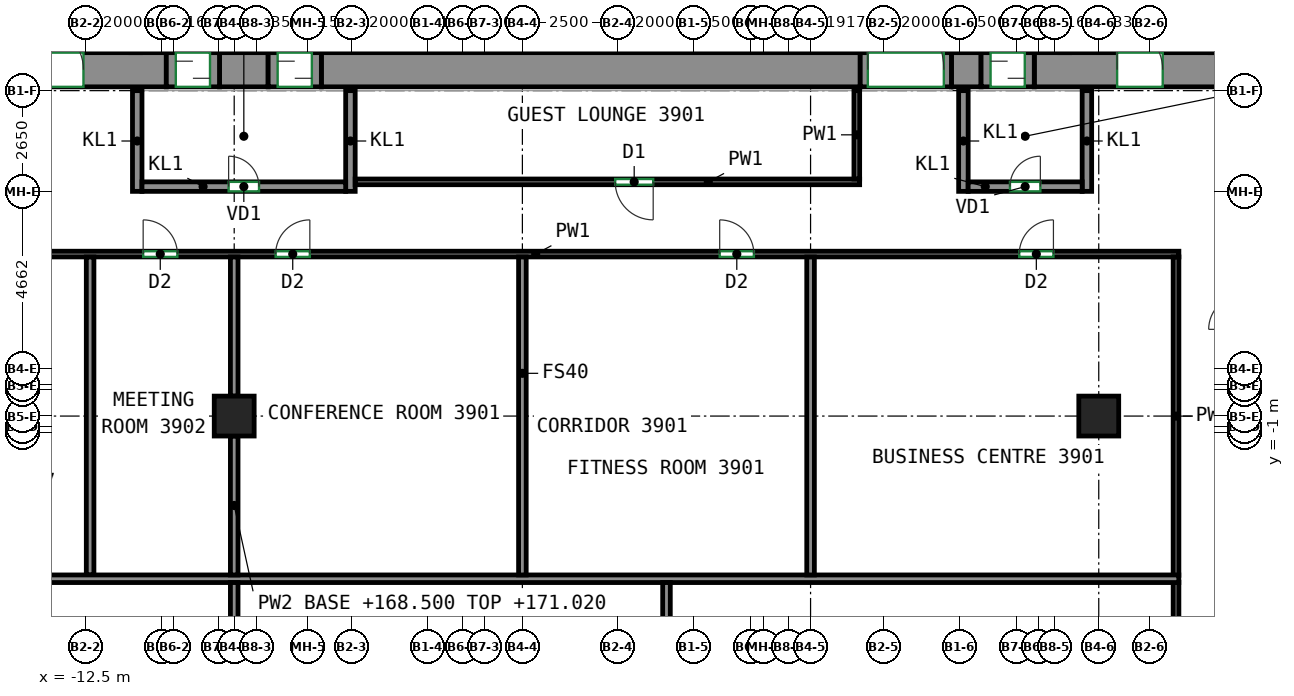
"""IFC4 building model, lengths in metres.
Left out: names, types, materials, properties, quantities, classifications, styles, units other than length and angle.
Written with IfcOpenShell. Run it as: python <this file> out.ifc"""

import sys

from ifc_helpers import new_model, si_unit, direction, frame, frame_2d, origin, origin_2d, place, context, subcontext, project, spatial, rectangle, extrude, source, transform, mapped, element, fill, save


model = new_model("IFC4")
c1 = context("Model", 3, precision=1e-05, world=origin(), true_north=direction((0.0, 1.0)))
c2 = subcontext(c1, "Body", "Model", "MODEL_VIEW")
j1 = project(units=[si_unit("LENGTHUNIT", "METRE"), si_unit("PLANEANGLEUNIT", "RADIAN")], contexts=[c1])
p1 = place(None, origin())
s1 = spatial("IfcSite", under=j1, at=p1, CompositionType="ELEMENT")
p2 = place(p1, origin())
s2 = spatial("IfcBuilding", under=s1, at=p2, CompositionType="ELEMENT")
p3 = place(p2, frame((0.0, 0.0, 168.5)))
s3 = spatial("IfcBuildingStorey", under=s2, at=p3, CompositionType="ELEMENT", Elevation=168.5)
m1 = source(origin(), c2, "Body", "SweptSolid", [
    extrude(rectangle(XDim=1.05, YDim=1.05, at=origin_2d()), origin(), (0.0, 0.0, 1.0), 3.12),
])
for number, where, z_axis, x_axis in (
    (1, (-8.583, -0.562, 0.0), (0.0, 0.0, 1.0), (1.0, 0.0, 0.0)),
    (2, (14.167, -0.562, 0.0), (0.0, 0.0, 1.0), (1.0, 0.0, 0.0)),
):
    element("IfcColumn", number, at=place(p3, frame(where, z_axis=z_axis, x_axis=x_axis)), inside=s3, PredefinedType="COLUMN", context=c2, shape_type="MappedRepresentation", body=[
        mapped(m1, transform((0.0, 0.0, 0.0))),
    ])
m2 = source(origin(), c2, "Body", "SweptSolid", [
    extrude(rectangle(XDim=5.53, YDim=0.9, at=frame_2d((2.765, 0.0))), origin(), (0.0, 0.0, 1.0), 3.12),
])
p4 = place(p3, frame((-15.9, 8.55, 0.0), z_axis=(0.0, 0.0, 1.0), x_axis=(1.0, 0.0, 0.0)))
e3 = element("IfcWall", 3, at=p4, inside=s3, PredefinedType="SHEAR", context=c2, shape_type="MappedRepresentation", body=[
    mapped(m2, transform((0.0, 0.0, 0.0))),
])
p5 = place(p4, frame((2.15, 0.0, 0.0)))
e4 = element("IfcOpeningElement", 4, at=p5, cuts=e3, PredefinedType="OPENING", context=c2, shape_type="SweptSolid", body=[
    extrude(rectangle(XDim=1.2, YDim=2.1, at=frame_2d((0.6, 1.05))), frame((0.0, 0.46, 0.0), z_axis=(0.0, -1.0, 0.0), x_axis=(1.0, 0.0, 0.0)), (0.0, 0.0, 1.0), 0.92),
])
m3 = source(origin(), c2, "Body", "SweptSolid", [
    extrude(rectangle(XDim=1.28, YDim=0.9, at=frame_2d((0.64, 0.0))), origin(), (0.0, 0.0, 1.0), 3.12),
])
p6 = place(p3, frame((-8.97, 8.55, 0.0), z_axis=(0.0, 0.0, 1.0), x_axis=(1.0, 0.0, 0.0)))
e5 = element("IfcWall", 5, at=p6, inside=s3, PredefinedType="SHEAR", context=c2, shape_type="MappedRepresentation", body=[
    mapped(m3, transform((0.0, 0.0, 0.0))),
])
m4 = source(origin(), c2, "Body", "SweptSolid", [
    extrude(rectangle(XDim=14.18, YDim=0.9, at=frame_2d((7.09, 0.0))), origin(), (0.0, 0.0, 1.0), 3.12),
])
p7 = place(p3, frame((-6.29, 8.55, 0.0), z_axis=(0.0, 0.0, 1.0), x_axis=(1.0, 0.0, 0.0)))
e6 = element("IfcWall", 6, at=p7, inside=s3, PredefinedType="SHEAR", context=c2, shape_type="MappedRepresentation", body=[
    mapped(m4, transform((0.0, 0.0, 0.0))),
])
m5 = source(origin(), c2, "Body", "SweptSolid", [
    extrude(rectangle(XDim=0.78, YDim=0.9, at=frame_2d((0.39, 0.0))), origin(), (0.0, 0.0, 1.0), 3.12),
])
p8 = place(p3, frame((10.29, 8.55, 0.0), z_axis=(0.0, 0.0, 1.0), x_axis=(1.0, 0.0, 0.0)))
e7 = element("IfcWall", 7, at=p8, inside=s3, PredefinedType="SHEAR", context=c2, shape_type="MappedRepresentation", body=[
    mapped(m5, transform((0.0, 0.0, 0.0))),
])
m6 = source(origin(), c2, "Body", "SweptSolid", [
    extrude(rectangle(XDim=5.53, YDim=0.9, at=frame_2d((2.765, 0.0))), origin(), (0.0, 0.0, 1.0), 3.12),
])
p9 = place(p3, frame((12.47, 8.55, 0.0), z_axis=(0.0, 0.0, 1.0), x_axis=(1.0, 0.0, 0.0)))
e8 = element("IfcWall", 8, at=p9, inside=s3, PredefinedType="SHEAR", context=c2, shape_type="MappedRepresentation", body=[
    mapped(m6, transform((0.0, 0.0, 0.0))),
])
p10 = place(p9, frame((2.18, 0.0, 0.0)))
e9 = element("IfcOpeningElement", 9, at=p10, cuts=e8, PredefinedType="OPENING", context=c2, shape_type="SweptSolid", body=[
    extrude(rectangle(XDim=1.2, YDim=2.1, at=frame_2d((0.6, 1.05))), frame((0.0, 0.46, 0.0), z_axis=(0.0, -1.0, 0.0), x_axis=(1.0, 0.0, 0.0)), (0.0, 0.0, 1.0), 0.92),
])
m7 = source(origin(), c2, "Body", "SweptSolid", [
    extrude(rectangle(XDim=2.65, YDim=0.25, at=frame_2d((1.325, 0.0))), origin(), (0.0, 0.0, 1.0), 3.12),
])
for number, where, z_axis, x_axis in (
    (10, (-11.135, 5.35, 0.0), (0.0, 0.0, 1.0), (0.0, 1.0, 0.0)),
    (11, (-5.525, 5.35, 0.0), (0.0, 0.0, 1.0), (0.0, 1.0, 0.0)),
):
    element("IfcWall", number, at=place(p3, frame(where, z_axis=z_axis, x_axis=x_axis)), inside=s3, PredefinedType="PARTITIONING", context=c2, shape_type="MappedRepresentation", body=[
        mapped(m7, transform((0.0, 0.0, 0.0))),
    ])
m8 = source(origin(), c2, "Body", "SweptSolid", [
    extrude(rectangle(XDim=5.36, YDim=0.25, at=frame_2d((2.68, 0.0))), origin(), (0.0, 0.0, 1.0), 3.12),
])
p11 = place(p3, frame((-11.01, 5.475, 0.0), z_axis=(0.0, 0.0, 1.0), x_axis=(1.0, 0.0, 0.0)))
e12 = element("IfcWall", 12, at=p11, inside=s3, PredefinedType="PARTITIONING", context=c2, shape_type="MappedRepresentation", body=[
    mapped(m8, transform((0.0, 0.0, 0.0))),
])
p12 = place(p11, frame((2.28, 0.0, 0.0)))
e13 = element("IfcOpeningElement", 13, at=p12, cuts=e12, PredefinedType="OPENING", context=c2, shape_type="SweptSolid", body=[
    extrude(rectangle(XDim=0.8, YDim=2.0, at=frame_2d((0.4, 1.0))), frame((0.0, 0.135, 0.0), z_axis=(0.0, -1.0, 0.0), x_axis=(1.0, 0.0, 0.0)), (0.0, 0.0, 1.0), 0.27),
])
for number, where, z_axis, x_axis in (
    (14, (10.605, 5.35, 0.0), (0.0, 0.0, 1.0), (0.0, 1.0, 0.0)),
    (15, (13.855, 5.35, 0.0), (0.0, 0.0, 1.0), (0.0, 1.0, 0.0)),
):
    element("IfcWall", number, at=place(p3, frame(where, z_axis=z_axis, x_axis=x_axis)), inside=s3, PredefinedType="PARTITIONING", context=c2, shape_type="MappedRepresentation", body=[
        mapped(m7, transform((0.0, 0.0, 0.0))),
    ])
m9 = source(origin(), c2, "Body", "SweptSolid", [
    extrude(rectangle(XDim=3.0, YDim=0.25, at=frame_2d((1.5, 0.0))), origin(), (0.0, 0.0, 1.0), 3.12),
])
p13 = place(p3, frame((10.73, 5.475, 0.0), z_axis=(0.0, 0.0, 1.0), x_axis=(1.0, 0.0, 0.0)))
e16 = element("IfcWall", 16, at=p13, inside=s3, PredefinedType="PARTITIONING", context=c2, shape_type="MappedRepresentation", body=[
    mapped(m9, transform((0.0, 0.0, 0.0))),
])
p14 = place(p13, frame((1.1, 0.0, 0.0)))
e17 = element("IfcOpeningElement", 17, at=p14, cuts=e16, PredefinedType="OPENING", context=c2, shape_type="SweptSolid", body=[
    extrude(rectangle(XDim=0.8, YDim=2.0, at=frame_2d((0.4, 1.0))), frame((0.0, 0.135, 0.0), z_axis=(0.0, -1.0, 0.0), x_axis=(1.0, 0.0, 0.0)), (0.0, 0.0, 1.0), 0.27),
])
m10 = source(origin(), c2, "Body", "SweptSolid", [
    extrude(rectangle(XDim=1.4, YDim=0.9, at=frame_2d((0.7, 0.0))), origin(), (0.0, 0.0, 1.0), 2.7),
])
p15 = place(p3, frame((-10.37, 8.55, 0.0), z_axis=(0.0, 0.0, 1.0), x_axis=(1.0, 0.0, 0.0)))
e18 = element("IfcWall", 18, at=p15, inside=s3, PredefinedType="PARTITIONING", context=c2, shape_type="MappedRepresentation", body=[
    mapped(m10, transform((0.0, 0.0, 0.0))),
])
p16 = place(p15, frame((0.25, 0.0, 0.0)))
e19 = element("IfcOpeningElement", 19, at=p16, cuts=e18, PredefinedType="OPENING", context=c2, shape_type="SweptSolid", body=[
    extrude(rectangle(XDim=0.9, YDim=2.1, at=frame_2d((0.45, 1.05))), frame((0.0, 0.46, 0.0), z_axis=(0.0, -1.0, 0.0), x_axis=(1.0, 0.0, 0.0)), (0.0, 0.0, 1.0), 0.92),
])
m11 = source(origin(), c2, "Body", "SweptSolid", [
    extrude(rectangle(XDim=1.4, YDim=0.9, at=frame_2d((0.7, 0.0))), origin(), (0.0, 0.0, 1.0), 2.7),
])
p17 = place(p3, frame((-7.69, 8.55, 0.0), z_axis=(0.0, 0.0, 1.0), x_axis=(1.0, 0.0, 0.0)))
e20 = element("IfcWall", 20, at=p17, inside=s3, PredefinedType="PARTITIONING", context=c2, shape_type="MappedRepresentation", body=[
    mapped(m11, transform((0.0, 0.0, 0.0))),
])
p18 = place(p17, frame((0.25, 0.0, 0.0)))
e21 = element("IfcOpeningElement", 21, at=p18, cuts=e20, PredefinedType="OPENING", context=c2, shape_type="SweptSolid", body=[
    extrude(rectangle(XDim=0.9, YDim=2.1, at=frame_2d((0.45, 1.05))), frame((0.0, 0.46, 0.0), z_axis=(0.0, -1.0, 0.0), x_axis=(1.0, 0.0, 0.0)), (0.0, 0.0, 1.0), 0.92),
])
m12 = source(origin(), c2, "Body", "SweptSolid", [
    extrude(rectangle(XDim=2.4, YDim=0.9, at=frame_2d((1.2, 0.0))), origin(), (0.0, 0.0, 1.0), 2.7),
])
p19 = place(p3, frame((7.89, 8.55, 0.0), z_axis=(0.0, 0.0, 1.0), x_axis=(1.0, 0.0, 0.0)))
e22 = element("IfcWall", 22, at=p19, inside=s3, PredefinedType="PARTITIONING", context=c2, shape_type="MappedRepresentation", body=[
    mapped(m12, transform((0.0, 0.0, 0.0))),
])
p20 = place(p19, frame((0.2, 0.0, 0.0)))
e23 = element("IfcOpeningElement", 23, at=p20, cuts=e22, PredefinedType="OPENING", context=c2, shape_type="SweptSolid", body=[
    extrude(rectangle(XDim=2.0, YDim=2.1, at=frame_2d((1.0, 1.05))), frame((0.0, 0.46, 0.0), z_axis=(0.0, -1.0, 0.0), x_axis=(1.0, 0.0, 0.0)), (0.0, 0.0, 1.0), 0.92),
])
p21 = place(p3, frame((11.07, 8.55, 0.0), z_axis=(0.0, 0.0, 1.0), x_axis=(1.0, 0.0, 0.0)))
e24 = element("IfcWall", 24, at=p21, inside=s3, PredefinedType="PARTITIONING", context=c2, shape_type="MappedRepresentation", body=[
    mapped(m11, transform((0.0, 0.0, 0.0))),
])
p22 = place(p21, frame((0.25, 0.0, 0.0)))
e25 = element("IfcOpeningElement", 25, at=p22, cuts=e24, PredefinedType="OPENING", context=c2, shape_type="SweptSolid", body=[
    extrude(rectangle(XDim=0.9, YDim=2.1, at=frame_2d((0.45, 1.05))), frame((0.0, 0.46, 0.0), z_axis=(0.0, -1.0, 0.0), x_axis=(1.0, 0.0, 0.0)), (0.0, 0.0, 1.0), 0.92),
])
p23 = place(p3, frame((7.875, 5.6, 0.0), z_axis=(0.0, 0.0, 1.0), x_axis=(-1.0, 0.0, 0.0)))
e26 = element("IfcWall", 26, at=p23, inside=s3, PredefinedType="PARTITIONING", context=c2, shape_type="SweptSolid", body=[
    extrude(rectangle(XDim=13.275, YDim=0.15, at=frame_2d((6.637, 0.0))), origin(), (0.0, 0.0, 1.0), 3.12),
])
p24 = place(p23, frame((5.433, 0.0, 0.0)))
e27 = element("IfcOpeningElement", 27, at=p24, cuts=e26, PredefinedType="OPENING", context=c2, shape_type="SweptSolid", body=[
    extrude(rectangle(XDim=1.0, YDim=2.1, at=frame_2d((0.5, 1.05))), frame((0.0, 0.085, 0.0), z_axis=(0.0, -1.0, 0.0), x_axis=(1.0, 0.0, 0.0)), (0.0, 0.0, 1.0), 0.17),
])
p25 = place(p3, frame((7.8, 8.0, 0.0), z_axis=(0.0, 0.0, 1.0), x_axis=(0.0, -1.0, 0.0)))
e28 = element("IfcWall", 28, at=p25, inside=s3, PredefinedType="PARTITIONING", context=c2, shape_type="SweptSolid", body=[
    extrude(rectangle(XDim=2.325, YDim=0.15, at=frame_2d((1.163, 0.0))), origin(), (0.0, 0.0, 1.0), 3.12),
])
p26 = place(p3, frame((-17.575, 3.7, 0.0), z_axis=(0.0, 0.0, 1.0), x_axis=(1.0, 0.0, 0.0)))
e29 = element("IfcWall", 29, at=p26, inside=s3, PredefinedType="PARTITIONING", context=c2, shape_type="SweptSolid", body=[
    extrude(rectangle(XDim=33.85, YDim=0.15, at=frame_2d((16.925, 0.0))), origin(), (0.0, 0.0, 1.0), 3.12),
])
p27 = place(p26, frame((6.596, 0.0, 0.0)))
e30 = element("IfcOpeningElement", 30, at=p27, cuts=e29, PredefinedType="OPENING", context=c2, shape_type="SweptSolid", body=[
    extrude(rectangle(XDim=0.9, YDim=2.1, at=frame_2d((0.45, 1.05))), frame((0.0, 0.085, 0.0), z_axis=(0.0, -1.0, 0.0), x_axis=(1.0, 0.0, 0.0)), (0.0, 0.0, 1.0), 0.17),
])
p28 = place(p26, frame((10.082, 0.0, 0.0)))
e31 = element("IfcOpeningElement", 31, at=p28, cuts=e29, PredefinedType="OPENING", context=c2, shape_type="SweptSolid", body=[
    extrude(rectangle(XDim=0.9, YDim=2.1, at=frame_2d((0.45, 1.05))), frame((0.0, 0.085, 0.0), z_axis=(0.0, -1.0, 0.0), x_axis=(1.0, 0.0, 0.0)), (0.0, 0.0, 1.0), 0.17),
])
p29 = place(p26, frame((21.767, 0.0, 0.0)))
e32 = element("IfcOpeningElement", 32, at=p29, cuts=e29, PredefinedType="OPENING", context=c2, shape_type="SweptSolid", body=[
    extrude(rectangle(XDim=0.9, YDim=2.1, at=frame_2d((0.45, 1.05))), frame((0.0, 0.085, 0.0), z_axis=(0.0, -1.0, 0.0), x_axis=(1.0, 0.0, 0.0)), (0.0, 0.0, 1.0), 0.17),
])
p30 = place(p26, frame((29.649, 0.0, 0.0)))
e33 = element("IfcOpeningElement", 33, at=p30, cuts=e29, PredefinedType="OPENING", context=c2, shape_type="SweptSolid", body=[
    extrude(rectangle(XDim=0.9, YDim=2.1, at=frame_2d((0.45, 1.05))), frame((0.0, 0.085, 0.0), z_axis=(0.0, -1.0, 0.0), x_axis=(1.0, 0.0, 0.0)), (0.0, 0.0, 1.0), 0.17),
])
p31 = place(p3, frame((16.2, -4.753, 0.0), z_axis=(0.0, 0.0, 1.0), x_axis=(0.0, 1.0, 0.0)))
e34 = element("IfcWall", 34, at=p31, inside=s3, PredefinedType="PARTITIONING", context=c2, shape_type="SweptSolid", body=[
    extrude(rectangle(XDim=8.378, YDim=0.15, at=frame_2d((4.189, 0.0))), origin(), (0.0, 0.0, 1.0), 3.12),
])
p32 = place(p3, frame((16.2, -15.425, 0.0), z_axis=(0.0, 0.0, 1.0), x_axis=(0.0, 1.0, 0.0)))
e35 = element("IfcWall", 35, at=p32, inside=s3, PredefinedType="PARTITIONING", context=c2, shape_type="SweptSolid", body=[
    extrude(rectangle(XDim=10.492, YDim=0.15, at=frame_2d((5.246, 0.0))), origin(), (0.0, 0.0, 1.0), 3.12),
])
p33 = place(p3, frame((-12.375, -4.743, 0.0), z_axis=(0.0, 0.0, 1.0), x_axis=(0.0, 1.0, 0.0)))
e36 = element("IfcWall", 36, at=p33, inside=s3, PredefinedType="PARTITIONING", context=c2, shape_type="SweptSolid", body=[
    extrude(rectangle(XDim=8.366, YDim=0.2, at=frame_2d((4.183, 0.0))), origin(), (0.0, 0.0, 1.0), 3.12),
])
p34 = place(p3, frame((-13.873, -4.843, 0.0), z_axis=(0.0, 0.0, 1.0), x_axis=(1.0, 0.0, 0.0)))
e37 = element("IfcWall", 37, at=p34, inside=s3, PredefinedType="PARTITIONING", context=c2, shape_type="SweptSolid", body=[
    extrude(rectangle(XDim=30.146, YDim=0.2, at=frame_2d((15.073, 0.0))), origin(), (0.0, 0.0, 1.0), 3.12),
])
p35 = place(p3, frame((-8.583, -0.037, 0.0), z_axis=(0.0, 0.0, 1.0), x_axis=(0.0, 1.0, 0.0)))
e38 = element("IfcWall", 38, at=p35, inside=s3, PredefinedType="PARTITIONING", context=c2, shape_type="SweptSolid", body=[
    extrude(rectangle(XDim=3.66, YDim=0.2, at=frame_2d((1.83, 0.0))), origin(), (0.0, 0.0, 1.0), 3.12),
])
p36 = place(p3, frame((-8.583, -4.743, 0.0), z_axis=(0.0, 0.0, 1.0), x_axis=(0.0, 1.0, 0.0)))
e39 = element("IfcWall", 39, at=p36, inside=s3, PredefinedType="PARTITIONING", context=c2, shape_type="SweptSolid", body=[
    extrude(rectangle(XDim=3.656, YDim=0.2, at=frame_2d((1.828, 0.0))), origin(), (0.0, 0.0, 1.0), 2.52),
])
for number, where, z_axis, x_axis in (
    (40, (-1.0, -4.743, 0.0), (0.0, 0.0, 1.0), (0.0, 1.0, 0.0)),
    (41, (6.583, -4.743, 0.0), (0.0, 0.0, 1.0), (0.0, 1.0, 0.0)),
):
    element("IfcWall", number, at=place(p3, frame(where, z_axis=z_axis, x_axis=x_axis)), inside=s3, PredefinedType="PARTITIONING", context=c2, shape_type="SweptSolid", body=[
        extrude(rectangle(XDim=8.366, YDim=0.2, at=frame_2d((4.183, 0.0))), origin(), (0.0, 0.0, 1.0), 3.12),
    ])
p37 = place(p3, frame((-8.583, -8.6, 0.0), z_axis=(0.0, 0.0, 1.0), x_axis=(0.0, 1.0, 0.0)))
e42 = element("IfcWall", 42, at=p37, inside=s3, PredefinedType="PARTITIONING", context=c2, shape_type="SweptSolid", body=[
    extrude(rectangle(XDim=3.657, YDim=0.2, at=frame_2d((1.829, 0.0))), origin(), (0.0, 0.0, 1.0), 2.52),
])
p38 = place(p3, frame((2.792, -15.423, 0.0), z_axis=(0.0, 0.0, 1.0), x_axis=(0.0, 1.0, 0.0)))
e43 = element("IfcWall", 43, at=p38, inside=s3, PredefinedType="PARTITIONING", context=c2, shape_type="SweptSolid", body=[
    extrude(rectangle(XDim=10.48, YDim=0.2, at=frame_2d((5.24, 0.0))), origin(), (0.0, 0.0, 1.0), 3.12),
])
p39 = place(p20, origin())
e44 = element("IfcDoor", 44, at=p39, inside=s3, OperationType="DOUBLE_DOOR_SINGLE_SWING", PredefinedType="DOOR", context=c2, shape_type="SweptSolid", body=[
    extrude(rectangle(XDim=2.0, YDim=2.1, at=frame_2d((1.0, 1.05))), frame((0.0, 0.355, 0.0), z_axis=(0.0, -1.0, 0.0), x_axis=(1.0, 0.0, 0.0)), (0.0, 0.0, 1.0), 0.05),
])
fill(e23, e44)
p40 = place(p12, origin())
e45 = element("IfcDoor", 45, at=p40, inside=s3, OperationType="SINGLE_SWING_LEFT", PredefinedType="DOOR", context=c2, shape_type="SweptSolid", body=[
    extrude(rectangle(XDim=0.8, YDim=2.0, at=frame_2d((0.4, 1.0))), frame((0.0, 0.025, 0.0), z_axis=(0.0, -1.0, 0.0), x_axis=(1.0, 0.0, 0.0)), (0.0, 0.0, 1.0), 0.05),
])
fill(e13, e45)
p41 = place(p14, origin())
e46 = element("IfcDoor", 46, at=p41, inside=s3, OperationType="SINGLE_SWING_RIGHT", PredefinedType="DOOR", context=c2, shape_type="SweptSolid", body=[
    extrude(rectangle(XDim=0.8, YDim=2.0, at=frame_2d((0.4, 1.0))), frame((0.0, 0.025, 0.0), z_axis=(0.0, -1.0, 0.0), x_axis=(1.0, 0.0, 0.0)), (0.0, 0.0, 1.0), 0.05),
])
fill(e17, e46)
p42 = place(p16, origin())
e47 = element("IfcDoor", 47, at=p42, inside=s3, OperationType="SLIDING_TO_LEFT", PredefinedType="DOOR", context=c2, shape_type="SweptSolid", body=[
    extrude(rectangle(XDim=0.9, YDim=2.1, at=frame_2d((0.45, 1.05))), frame((0.0, 0.355, 0.0), z_axis=(0.0, -1.0, 0.0), x_axis=(1.0, 0.0, 0.0)), (0.0, 0.0, 1.0), 0.05),
])
fill(e19, e47)
p43 = place(p18, origin())
e48 = element("IfcDoor", 48, at=p43, inside=s3, OperationType="SLIDING_TO_RIGHT", PredefinedType="DOOR", context=c2, shape_type="SweptSolid", body=[
    extrude(rectangle(XDim=0.9, YDim=2.1, at=frame_2d((0.45, 1.05))), frame((0.0, 0.355, 0.0), z_axis=(0.0, -1.0, 0.0), x_axis=(1.0, 0.0, 0.0)), (0.0, 0.0, 1.0), 0.05),
])
fill(e21, e48)
p44 = place(p22, origin())
e49 = element("IfcDoor", 49, at=p44, inside=s3, OperationType="SLIDING_TO_LEFT", PredefinedType="DOOR", context=c2, shape_type="SweptSolid", body=[
    extrude(rectangle(XDim=0.9, YDim=2.1, at=frame_2d((0.45, 1.05))), frame((0.0, 0.355, 0.0), z_axis=(0.0, -1.0, 0.0), x_axis=(1.0, 0.0, 0.0)), (0.0, 0.0, 1.0), 0.05),
])
fill(e25, e49)
p45 = place(p5, origin())
e50 = element("IfcDoor", 50, at=p45, inside=s3, OperationType="DOUBLE_DOOR_SINGLE_SWING", PredefinedType="DOOR", context=c2, shape_type="SweptSolid", body=[
    extrude(rectangle(XDim=1.2, YDim=2.1, at=frame_2d((0.6, 1.05))), frame((0.0, 0.355, 0.0), z_axis=(0.0, -1.0, 0.0), x_axis=(1.0, 0.0, 0.0)), (0.0, 0.0, 1.0), 0.05),
])
fill(e4, e50)
p46 = place(p10, origin())
e51 = element("IfcDoor", 51, at=p46, inside=s3, OperationType="DOUBLE_DOOR_SINGLE_SWING", PredefinedType="DOOR", context=c2, shape_type="SweptSolid", body=[
    extrude(rectangle(XDim=1.2, YDim=2.1, at=frame_2d((0.6, 1.05))), frame((0.0, 0.355, 0.0), z_axis=(0.0, -1.0, 0.0), x_axis=(1.0, 0.0, 0.0)), (0.0, 0.0, 1.0), 0.05),
])
fill(e9, e51)
p47 = place(p27, origin())
e52 = element("IfcDoor", 52, at=p47, inside=s3, OperationType="SINGLE_SWING_LEFT", PredefinedType="DOOR", context=c2, shape_type="SweptSolid", body=[
    extrude(rectangle(XDim=0.9, YDim=2.1, at=frame_2d((0.45, 1.05))), frame((0.0, 0.025, 0.0), z_axis=(0.0, -1.0, 0.0), x_axis=(1.0, 0.0, 0.0)), (0.0, 0.0, 1.0), 0.05),
])
fill(e30, e52)
p48 = place(p28, origin())
e53 = element("IfcDoor", 53, at=p48, inside=s3, OperationType="SINGLE_SWING_RIGHT", PredefinedType="DOOR", context=c2, shape_type="SweptSolid", body=[
    extrude(rectangle(XDim=0.9, YDim=2.1, at=frame_2d((0.45, 1.05))), frame((0.0, 0.025, 0.0), z_axis=(0.0, -1.0, 0.0), x_axis=(1.0, 0.0, 0.0)), (0.0, 0.0, 1.0), 0.05),
])
fill(e31, e53)
p49 = place(p29, origin())
e54 = element("IfcDoor", 54, at=p49, inside=s3, OperationType="SINGLE_SWING_LEFT", PredefinedType="DOOR", context=c2, shape_type="SweptSolid", body=[
    extrude(rectangle(XDim=0.9, YDim=2.1, at=frame_2d((0.45, 1.05))), frame((0.0, 0.025, 0.0), z_axis=(0.0, -1.0, 0.0), x_axis=(1.0, 0.0, 0.0)), (0.0, 0.0, 1.0), 0.05),
])
fill(e32, e54)
p50 = place(p30, origin())
e55 = element("IfcDoor", 55, at=p50, inside=s3, OperationType="SINGLE_SWING_RIGHT", PredefinedType="DOOR", context=c2, shape_type="SweptSolid", body=[
    extrude(rectangle(XDim=0.9, YDim=2.1, at=frame_2d((0.45, 1.05))), frame((0.0, 0.025, 0.0), z_axis=(0.0, -1.0, 0.0), x_axis=(1.0, 0.0, 0.0)), (0.0, 0.0, 1.0), 0.05),
])
fill(e33, e55)
p51 = place(p24, origin())
e56 = element("IfcDoor", 56, at=p51, inside=s3, OperationType="SINGLE_SWING_LEFT", PredefinedType="DOOR", context=c2, shape_type="SweptSolid", body=[
    extrude(rectangle(XDim=1.0, YDim=2.1, at=frame_2d((0.5, 1.05))), frame((0.0, 0.025, 0.0), z_axis=(0.0, -1.0, 0.0), x_axis=(1.0, 0.0, 0.0)), (0.0, 0.0, 1.0), 0.05),
])
fill(e27, e56)
save(model, sys.argv[1])
